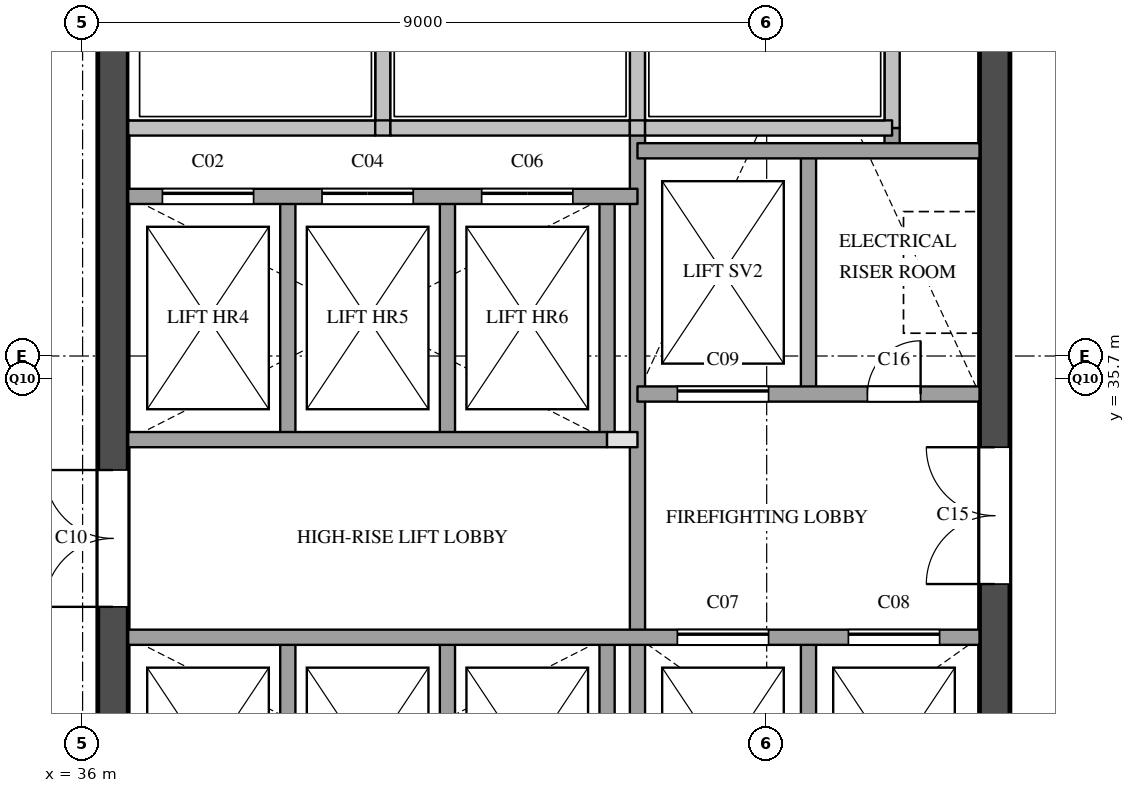
"""IFC4 building model, lengths in metres.
Left out: names, types, materials, properties, quantities, classifications, styles, units other than length and angle.
Written with IfcOpenShell. Run it as: python <this file> out.ifc"""

import sys

from ifc_helpers import new_model, si_unit, direction, frame, frame_2d, origin, place, context, subcontext, project, spatial, rectangle, extrude, element, fill, save


model = new_model("IFC4")
c1 = context("Model", 3, precision=1e-05, world=origin(), true_north=direction((0.0, 1.0)))
c2 = subcontext(c1, "Body", "Model", "MODEL_VIEW")
j1 = project(units=[si_unit("LENGTHUNIT", "METRE"), si_unit("PLANEANGLEUNIT", "RADIAN")], contexts=[c1])
p1 = place(None, origin())
s1 = spatial("IfcSite", under=j1, at=p1, CompositionType="ELEMENT")
p2 = place(p1, origin())
s2 = spatial("IfcBuilding", under=s1, at=p2, CompositionType="ELEMENT")
p3 = place(p2, frame((0.0, 0.0, 230.6)))
s3 = spatial("IfcBuildingStorey", under=s2, at=p3, CompositionType="ELEMENT", Elevation=230.6)
p4 = place(p3, frame((36.4, 29.1, 0.0), z_axis=(0.0, 0.0, 1.0), x_axis=(0.0, 1.0, 0.0)))
e1 = element("IfcWall", 1, at=p4, inside=s3, PredefinedType="SHEAR", context=c2, shape_type="SweptSolid", body=[
    extrude(rectangle(XDim=20.3, YDim=0.4, at=frame_2d((10.15, 0.0))), origin(), (0.0, 0.0, 1.0), 3.6),
])
p5 = place(p4, frame((3.6, 0.0, 0.0)))
e2 = element("IfcOpeningElement", 2, at=p5, cuts=e1, PredefinedType="OPENING", context=c2, shape_type="SweptSolid", body=[
    extrude(rectangle(XDim=1.8, YDim=2.1, at=frame_2d((0.9, 1.05))), frame((0.0, 0.21, 0.0), z_axis=(0.0, -1.0, 0.0), x_axis=(1.0, 0.0, 0.0)), (0.0, 0.0, 1.0), 0.42),
])
p6 = place(p3, frame((48.0, 29.1, 0.0), z_axis=(0.0, 0.0, 1.0), x_axis=(0.0, 1.0, 0.0)))
e3 = element("IfcWall", 3, at=p6, inside=s3, PredefinedType="SHEAR", context=c2, shape_type="SweptSolid", body=[
    extrude(rectangle(XDim=20.3, YDim=0.4, at=frame_2d((10.15, 0.0))), origin(), (0.0, 0.0, 1.0), 3.6),
])
p7 = place(p6, frame((12.5, 0.0, 0.0)))
e4 = element("IfcOpeningElement", 4, at=p7, cuts=e3, PredefinedType="OPENING", context=c2, shape_type="SweptSolid", body=[
    extrude(rectangle(XDim=0.7, YDim=2.1, at=frame_2d((0.35, 1.05))), frame((0.0, 0.21, 0.0), z_axis=(0.0, -1.0, 0.0), x_axis=(1.0, 0.0, 0.0)), (0.0, 0.0, 1.0), 0.42),
])
p8 = place(p6, frame((3.9, 0.0, 0.0)))
e5 = element("IfcOpeningElement", 5, at=p8, cuts=e3, PredefinedType="OPENING", context=c2, shape_type="SweptSolid", body=[
    extrude(rectangle(XDim=1.8, YDim=2.1, at=frame_2d((0.9, 1.05))), frame((0.0, 0.21, 0.0), z_axis=(0.0, -1.0, 0.0), x_axis=(1.0, 0.0, 0.0)), (0.0, 0.0, 1.0), 0.42),
])
p9 = place(p6, frame((16.4, 0.0, 0.0)))
e6 = element("IfcOpeningElement", 6, at=p9, cuts=e3, PredefinedType="OPENING", context=c2, shape_type="SweptSolid", body=[
    extrude(rectangle(XDim=1.0, YDim=2.1, at=frame_2d((0.5, 1.05))), frame((0.0, 0.21, 0.0), z_axis=(0.0, -1.0, 0.0), x_axis=(1.0, 0.0, 0.0)), (0.0, 0.0, 1.0), 0.42),
])
p10 = place(p3, frame((38.7, 29.1, 0.0), z_axis=(0.0, 0.0, 1.0), x_axis=(0.0, 1.0, 0.0)))
e7 = element("IfcWall", 7, at=p10, inside=s3, PredefinedType="SOLIDWALL", context=c2, shape_type="SweptSolid", body=[
    extrude(rectangle(XDim=3.2, YDim=0.2, at=frame_2d((1.6, 0.0))), origin(), (0.0, 0.0, 1.0), 3.6),
])
p11 = place(p3, frame((38.7, 34.9, 0.0), z_axis=(0.0, 0.0, 1.0), x_axis=(0.0, 1.0, 0.0)))
e8 = element("IfcWall", 8, at=p11, inside=s3, PredefinedType="SOLIDWALL", context=c2, shape_type="SweptSolid", body=[
    extrude(rectangle(XDim=3.2, YDim=0.2, at=frame_2d((1.6, 0.0))), origin(), (0.0, 0.0, 1.0), 3.6),
])
p12 = place(p3, frame((39.95, 39.0, 0.0), z_axis=(0.0, 0.0, 1.0), x_axis=(0.0, 1.0, 0.0)))
e9 = element("IfcWall", 9, at=p12, inside=s3, PredefinedType="SOLIDWALL", context=c2, shape_type="SweptSolid", body=[
    extrude(rectangle(XDim=1.78, YDim=0.2, at=frame_2d((0.89, 0.0))), origin(), (0.0, 0.0, 1.0), 3.6),
])
p13 = place(p3, frame((40.8, 29.1, 0.0), z_axis=(0.0, 0.0, 1.0), x_axis=(0.0, 1.0, 0.0)))
e10 = element("IfcWall", 10, at=p13, inside=s3, PredefinedType="SOLIDWALL", context=c2, shape_type="SweptSolid", body=[
    extrude(rectangle(XDim=3.2, YDim=0.2, at=frame_2d((1.6, 0.0))), origin(), (0.0, 0.0, 1.0), 3.6),
])
p14 = place(p3, frame((40.8, 34.9, 0.0), z_axis=(0.0, 0.0, 1.0), x_axis=(0.0, 1.0, 0.0)))
e11 = element("IfcWall", 11, at=p14, inside=s3, PredefinedType="SOLIDWALL", context=c2, shape_type="SweptSolid", body=[
    extrude(rectangle(XDim=3.2, YDim=0.2, at=frame_2d((1.6, 0.0))), origin(), (0.0, 0.0, 1.0), 3.6),
])
p15 = place(p3, frame((42.9, 29.1, 0.0), z_axis=(0.0, 0.0, 1.0), x_axis=(0.0, 1.0, 0.0)))
e12 = element("IfcWall", 12, at=p15, inside=s3, PredefinedType="SOLIDWALL", context=c2, shape_type="SweptSolid", body=[
    extrude(rectangle(XDim=3.2, YDim=0.2, at=frame_2d((1.6, 0.0))), origin(), (0.0, 0.0, 1.0), 3.6),
])
p16 = place(p3, frame((42.9, 34.9, 0.0), z_axis=(0.0, 0.0, 1.0), x_axis=(0.0, 1.0, 0.0)))
e13 = element("IfcWall", 13, at=p16, inside=s3, PredefinedType="SOLIDWALL", context=c2, shape_type="SweptSolid", body=[
    extrude(rectangle(XDim=3.2, YDim=0.2, at=frame_2d((1.6, 0.0))), origin(), (0.0, 0.0, 1.0), 3.6),
])
p17 = place(p3, frame((43.3, 29.1, 0.0), z_axis=(0.0, 0.0, 1.0), x_axis=(0.0, 1.0, 0.0)))
e14 = element("IfcWall", 14, at=p17, inside=s3, PredefinedType="SOLIDWALL", context=c2, shape_type="SweptSolid", body=[
    extrude(rectangle(XDim=9.9, YDim=0.2, at=frame_2d((4.95, 0.0))), origin(), (0.0, 0.0, 1.0), 3.6),
])
p18 = place(p3, frame((43.3, 39.0, 0.0), z_axis=(0.0, 0.0, 1.0), x_axis=(0.0, 1.0, 0.0)))
e15 = element("IfcWall", 15, at=p18, inside=s3, PredefinedType="SOLIDWALL", context=c2, shape_type="SweptSolid", body=[
    extrude(rectangle(XDim=1.78, YDim=0.2, at=frame_2d((0.89, 0.0))), origin(), (0.0, 0.0, 1.0), 3.6),
])
for number, where, z_axis, x_axis in (
    (16, (45.55, 29.1, 0.0), (0.0, 0.0, 1.0), (0.0, 1.0, 0.0)),
    (17, (45.55, 35.5, 0.0), (0.0, 0.0, 1.0), (0.0, 1.0, 0.0)),
):
    element("IfcWall", number, at=place(p3, frame(where, z_axis=z_axis, x_axis=x_axis)), inside=s3, PredefinedType="SOLIDWALL", context=c2, shape_type="SweptSolid", body=[
        extrude(rectangle(XDim=3.2, YDim=0.2, at=frame_2d((1.6, 0.0))), origin(), (0.0, 0.0, 1.0), 3.6),
    ])
p19 = place(p3, frame((46.65, 38.7, 0.0), z_axis=(0.0, 0.0, 1.0), x_axis=(0.0, 1.0, 0.0)))
e18 = element("IfcWall", 18, at=p19, inside=s3, PredefinedType="SOLIDWALL", context=c2, shape_type="SweptSolid", body=[
    extrude(rectangle(XDim=0.3, YDim=0.2, at=frame_2d((0.15, 0.0))), origin(), (0.0, 0.0, 1.0), 3.6),
])
p20 = place(p3, frame((46.65, 39.0, 0.0), z_axis=(0.0, 0.0, 1.0), x_axis=(0.0, 1.0, 0.0)))
e19 = element("IfcWall", 19, at=p20, inside=s3, PredefinedType="SOLIDWALL", context=c2, shape_type="SweptSolid", body=[
    extrude(rectangle(XDim=1.78, YDim=0.2, at=frame_2d((0.89, 0.0))), origin(), (0.0, 0.0, 1.0), 3.6),
])
p21 = place(p3, frame((36.6, 32.3, 0.0), z_axis=(0.0, 0.0, 1.0), x_axis=(1.0, 0.0, 0.0)))
e20 = element("IfcWall", 20, at=p21, inside=s3, PredefinedType="SOLIDWALL", context=c2, shape_type="SweptSolid", body=[
    extrude(rectangle(XDim=11.2, YDim=0.2, at=frame_2d((5.6, 0.0))), origin(), (0.0, 0.0, 1.0), 3.6),
])
p22 = place(p21, frame((7.225, 0.0, 0.0)))
e21 = element("IfcOpeningElement", 21, at=p22, cuts=e20, PredefinedType="OPENING", context=c2, shape_type="SweptSolid", body=[
    extrude(rectangle(XDim=1.2, YDim=2.1, at=frame_2d((0.6, 1.05))), frame((0.0, 0.11, 0.0), z_axis=(0.0, -1.0, 0.0), x_axis=(1.0, 0.0, 0.0)), (0.0, 0.0, 1.0), 0.22),
])
p23 = place(p21, frame((9.475, 0.0, 0.0)))
e22 = element("IfcOpeningElement", 22, at=p23, cuts=e20, PredefinedType="OPENING", context=c2, shape_type="SweptSolid", body=[
    extrude(rectangle(XDim=1.2, YDim=2.1, at=frame_2d((0.6, 1.05))), frame((0.0, 0.11, 0.0), z_axis=(0.0, -1.0, 0.0), x_axis=(1.0, 0.0, 0.0)), (0.0, 0.0, 1.0), 0.22),
])
p24 = place(p3, frame((42.9, 34.9, 0.0), z_axis=(0.0, 0.0, 1.0), x_axis=(1.0, 0.0, 0.0)))
e23 = element("IfcWall", 23, at=p24, inside=s3, PredefinedType="PARTITIONING", context=c2, shape_type="SweptSolid", body=[
    extrude(rectangle(XDim=0.4, YDim=0.2, at=frame_2d((0.2, 0.0))), origin(), (0.0, 0.0, 1.0), 3.6),
])
p25 = place(p3, frame((36.6, 34.9, 0.0), z_axis=(0.0, 0.0, 1.0), x_axis=(1.0, 0.0, 0.0)))
e24 = element("IfcWall", 24, at=p25, inside=s3, PredefinedType="SOLIDWALL", context=c2, shape_type="SweptSolid", body=[
    extrude(rectangle(XDim=6.3, YDim=0.2, at=frame_2d((3.15, 0.0))), origin(), (0.0, 0.0, 1.0), 3.6),
])
p26 = place(p3, frame((43.3, 35.5, 0.0), z_axis=(0.0, 0.0, 1.0), x_axis=(1.0, 0.0, 0.0)))
e25 = element("IfcWall", 25, at=p26, inside=s3, PredefinedType="SOLIDWALL", context=c2, shape_type="SweptSolid", body=[
    extrude(rectangle(XDim=4.5, YDim=0.2, at=frame_2d((2.25, 0.0))), origin(), (0.0, 0.0, 1.0), 3.6),
])
p27 = place(p26, frame((0.525, 0.0, 0.0)))
e26 = element("IfcOpeningElement", 26, at=p27, cuts=e25, PredefinedType="OPENING", context=c2, shape_type="SweptSolid", body=[
    extrude(rectangle(XDim=1.2, YDim=2.1, at=frame_2d((0.6, 1.05))), frame((0.0, 0.11, 0.0), z_axis=(0.0, -1.0, 0.0), x_axis=(1.0, 0.0, 0.0)), (0.0, 0.0, 1.0), 0.22),
])
p28 = place(p26, frame((3.025, 0.0, 0.0)))
e27 = element("IfcOpeningElement", 27, at=p28, cuts=e25, PredefinedType="OPENING", context=c2, shape_type="SweptSolid", body=[
    extrude(rectangle(XDim=0.7, YDim=2.1, at=frame_2d((0.35, 1.05))), frame((0.0, 0.11, 0.0), z_axis=(0.0, -1.0, 0.0), x_axis=(1.0, 0.0, 0.0)), (0.0, 0.0, 1.0), 0.22),
])
p29 = place(p3, frame((36.6, 38.1, 0.0), z_axis=(0.0, 0.0, 1.0), x_axis=(1.0, 0.0, 0.0)))
e28 = element("IfcWall", 28, at=p29, inside=s3, PredefinedType="SOLIDWALL", context=c2, shape_type="SweptSolid", body=[
    extrude(rectangle(XDim=6.7, YDim=0.2, at=frame_2d((3.35, 0.0))), origin(), (0.0, 0.0, 1.0), 3.6),
])
p30 = place(p29, frame((0.45, 0.0, 0.0)))
e29 = element("IfcOpeningElement", 29, at=p30, cuts=e28, PredefinedType="OPENING", context=c2, shape_type="SweptSolid", body=[
    extrude(rectangle(XDim=1.2, YDim=2.1, at=frame_2d((0.6, 1.05))), frame((0.0, 0.11, 0.0), z_axis=(0.0, -1.0, 0.0), x_axis=(1.0, 0.0, 0.0)), (0.0, 0.0, 1.0), 0.22),
])
p31 = place(p29, frame((2.55, 0.0, 0.0)))
e30 = element("IfcOpeningElement", 30, at=p31, cuts=e28, PredefinedType="OPENING", context=c2, shape_type="SweptSolid", body=[
    extrude(rectangle(XDim=1.2, YDim=2.1, at=frame_2d((0.6, 1.05))), frame((0.0, 0.11, 0.0), z_axis=(0.0, -1.0, 0.0), x_axis=(1.0, 0.0, 0.0)), (0.0, 0.0, 1.0), 0.22),
])
p32 = place(p29, frame((4.65, 0.0, 0.0)))
e31 = element("IfcOpeningElement", 31, at=p32, cuts=e28, PredefinedType="OPENING", context=c2, shape_type="SweptSolid", body=[
    extrude(rectangle(XDim=1.2, YDim=2.1, at=frame_2d((0.6, 1.05))), frame((0.0, 0.11, 0.0), z_axis=(0.0, -1.0, 0.0), x_axis=(1.0, 0.0, 0.0)), (0.0, 0.0, 1.0), 0.22),
])
p33 = place(p3, frame((43.3, 38.7, 0.0), z_axis=(0.0, 0.0, 1.0), x_axis=(1.0, 0.0, 0.0)))
e32 = element("IfcWall", 32, at=p33, inside=s3, PredefinedType="SOLIDWALL", context=c2, shape_type="SweptSolid", body=[
    extrude(rectangle(XDim=4.5, YDim=0.2, at=frame_2d((2.25, 0.0))), origin(), (0.0, 0.0, 1.0), 3.6),
])
p34 = place(p3, frame((36.6, 39.0, 0.0), z_axis=(0.0, 0.0, 1.0), x_axis=(1.0, 0.0, 0.0)))
e33 = element("IfcWall", 33, at=p34, inside=s3, PredefinedType="SOLIDWALL", context=c2, shape_type="SweptSolid", body=[
    extrude(rectangle(XDim=3.25, YDim=0.2, at=frame_2d((1.625, 0.0))), origin(), (0.0, 0.0, 1.0), 3.6),
])
p35 = place(p3, frame((39.85, 39.0, 0.0), z_axis=(0.0, 0.0, 1.0), x_axis=(1.0, 0.0, 0.0)))
e34 = element("IfcWall", 34, at=p35, inside=s3, PredefinedType="SOLIDWALL", context=c2, shape_type="SweptSolid", body=[
    extrude(rectangle(XDim=0.2, YDim=0.2, at=frame_2d((0.1, 0.0))), origin(), (0.0, 0.0, 1.0), 3.6),
])
p36 = place(p3, frame((40.05, 39.0, 0.0), z_axis=(0.0, 0.0, 1.0), x_axis=(1.0, 0.0, 0.0)))
e35 = element("IfcWall", 35, at=p36, inside=s3, PredefinedType="SOLIDWALL", context=c2, shape_type="SweptSolid", body=[
    extrude(rectangle(XDim=3.15, YDim=0.2, at=frame_2d((1.575, 0.0))), origin(), (0.0, 0.0, 1.0), 3.6),
])
p37 = place(p3, frame((43.2, 39.0, 0.0), z_axis=(0.0, 0.0, 1.0), x_axis=(1.0, 0.0, 0.0)))
e36 = element("IfcWall", 36, at=p37, inside=s3, PredefinedType="SOLIDWALL", context=c2, shape_type="SweptSolid", body=[
    extrude(rectangle(XDim=0.2, YDim=0.2, at=frame_2d((0.1, 0.0))), origin(), (0.0, 0.0, 1.0), 3.6),
])
p38 = place(p3, frame((43.4, 39.0, 0.0), z_axis=(0.0, 0.0, 1.0), x_axis=(1.0, 0.0, 0.0)))
e37 = element("IfcWall", 37, at=p38, inside=s3, PredefinedType="SOLIDWALL", context=c2, shape_type="SweptSolid", body=[
    extrude(rectangle(XDim=3.25, YDim=0.2, at=frame_2d((1.625, 0.0))), origin(), (0.0, 0.0, 1.0), 3.6),
])
p39 = place(p30, origin())
e38 = element("IfcDoor", 38, at=p39, inside=s3, OperationType="SLIDING_TO_LEFT", PredefinedType="DOOR", context=c2, shape_type="SweptSolid", body=[
    extrude(rectangle(XDim=1.2, YDim=2.1, at=frame_2d((0.6, 1.05))), frame((0.0, 0.025, 0.0), z_axis=(0.0, -1.0, 0.0), x_axis=(1.0, 0.0, 0.0)), (0.0, 0.0, 1.0), 0.05),
])
fill(e29, e38)
p40 = place(p31, origin())
e39 = element("IfcDoor", 39, at=p40, inside=s3, OperationType="SLIDING_TO_LEFT", PredefinedType="DOOR", context=c2, shape_type="SweptSolid", body=[
    extrude(rectangle(XDim=1.2, YDim=2.1, at=frame_2d((0.6, 1.05))), frame((0.0, 0.025, 0.0), z_axis=(0.0, -1.0, 0.0), x_axis=(1.0, 0.0, 0.0)), (0.0, 0.0, 1.0), 0.05),
])
fill(e30, e39)
p41 = place(p32, origin())
e40 = element("IfcDoor", 40, at=p41, inside=s3, OperationType="SLIDING_TO_LEFT", PredefinedType="DOOR", context=c2, shape_type="SweptSolid", body=[
    extrude(rectangle(XDim=1.2, YDim=2.1, at=frame_2d((0.6, 1.05))), frame((0.0, 0.025, 0.0), z_axis=(0.0, -1.0, 0.0), x_axis=(1.0, 0.0, 0.0)), (0.0, 0.0, 1.0), 0.05),
])
fill(e31, e40)
p42 = place(p22, origin())
e41 = element("IfcDoor", 41, at=p42, inside=s3, OperationType="SLIDING_TO_LEFT", PredefinedType="DOOR", context=c2, shape_type="SweptSolid", body=[
    extrude(rectangle(XDim=1.2, YDim=2.1, at=frame_2d((0.6, 1.05))), frame((0.0, 0.025, 0.0), z_axis=(0.0, -1.0, 0.0), x_axis=(1.0, 0.0, 0.0)), (0.0, 0.0, 1.0), 0.05),
])
fill(e21, e41)
p43 = place(p23, origin())
e42 = element("IfcDoor", 42, at=p43, inside=s3, OperationType="SLIDING_TO_LEFT", PredefinedType="DOOR", context=c2, shape_type="SweptSolid", body=[
    extrude(rectangle(XDim=1.2, YDim=2.1, at=frame_2d((0.6, 1.05))), frame((0.0, 0.025, 0.0), z_axis=(0.0, -1.0, 0.0), x_axis=(1.0, 0.0, 0.0)), (0.0, 0.0, 1.0), 0.05),
])
fill(e22, e42)
p44 = place(p27, origin())
e43 = element("IfcDoor", 43, at=p44, inside=s3, OperationType="SLIDING_TO_LEFT", PredefinedType="DOOR", context=c2, shape_type="SweptSolid", body=[
    extrude(rectangle(XDim=1.2, YDim=2.1, at=frame_2d((0.6, 1.05))), frame((0.0, 0.025, 0.0), z_axis=(0.0, -1.0, 0.0), x_axis=(1.0, 0.0, 0.0)), (0.0, 0.0, 1.0), 0.05),
])
fill(e26, e43)
p45 = place(p5, origin())
e44 = element("IfcDoor", 44, at=p45, inside=s3, OperationType="DOUBLE_DOOR_SINGLE_SWING", PredefinedType="DOOR", context=c2, shape_type="SweptSolid", body=[
    extrude(rectangle(XDim=1.8, YDim=2.1, at=frame_2d((0.9, 1.05))), frame((0.0, 0.025, 0.0), z_axis=(0.0, -1.0, 0.0), x_axis=(1.0, 0.0, 0.0)), (0.0, 0.0, 1.0), 0.05),
])
fill(e2, e44)
p46 = place(p8, origin())
e45 = element("IfcDoor", 45, at=p46, inside=s3, OperationType="DOUBLE_DOOR_SINGLE_SWING", PredefinedType="DOOR", context=c2, shape_type="SweptSolid", body=[
    extrude(rectangle(XDim=1.8, YDim=2.1, at=frame_2d((0.9, 1.05))), frame((0.0, 0.025, 0.0), z_axis=(0.0, -1.0, 0.0), x_axis=(1.0, 0.0, 0.0)), (0.0, 0.0, 1.0), 0.05),
])
fill(e5, e45)
p47 = place(p28, origin())
e46 = element("IfcDoor", 46, at=p47, inside=s3, OperationType="SINGLE_SWING_RIGHT", PredefinedType="DOOR", context=c2, shape_type="SweptSolid", body=[
    extrude(rectangle(XDim=0.7, YDim=2.1, at=frame_2d((0.35, 1.05))), frame((0.0, 0.025, 0.0), z_axis=(0.0, -1.0, 0.0), x_axis=(1.0, 0.0, 0.0)), (0.0, 0.0, 1.0), 0.05),
])
fill(e27, e46)
save(model, sys.argv[1])
